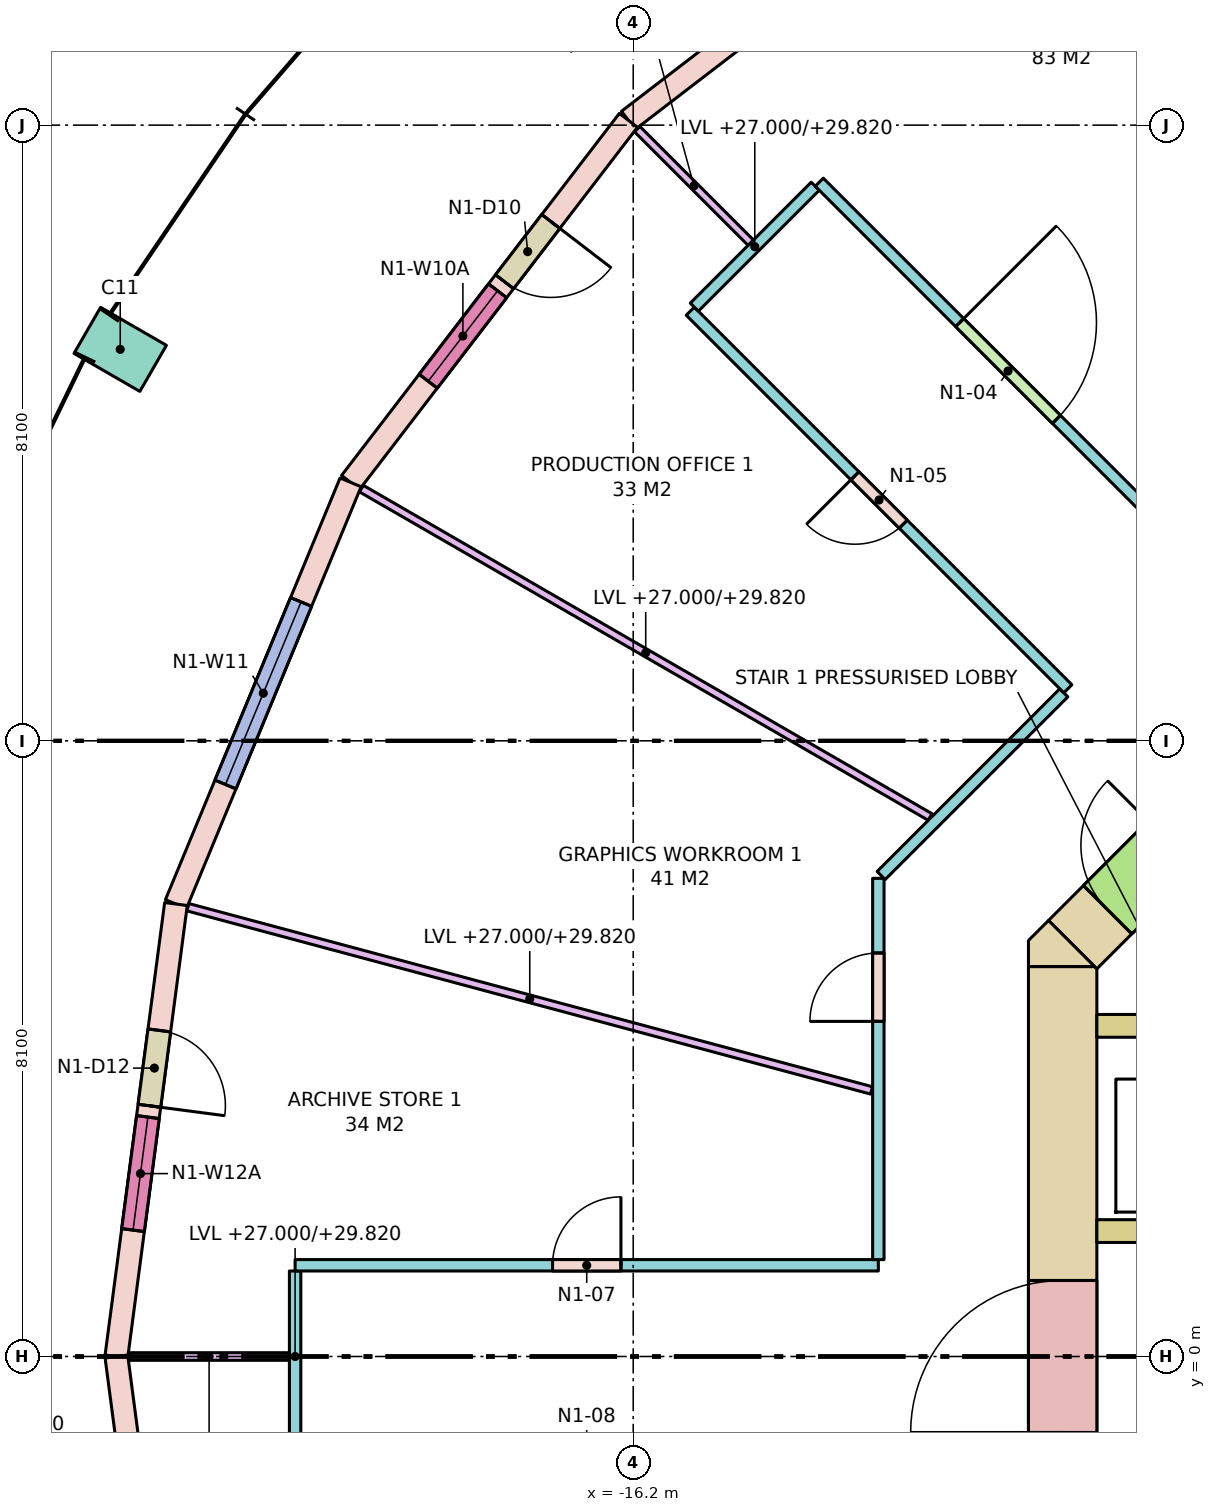
"""IFC4 building model, lengths in metres.
Left out: names, types, materials, properties, quantities, classifications, styles, units other than length and angle.
Written with IfcOpenShell. Run it as: python <this file> out.ifc"""

import sys

from ifc_helpers import new_model, si_unit, direction, frame, frame_2d, origin, origin_2d, place, context, subcontext, project, spatial, polyline, rectangle, outline, extrude, element, fill, save


model = new_model("IFC4")
c1 = context("Model", 3, precision=1e-05, world=origin(), true_north=direction((0.0, 1.0)))
c2 = subcontext(c1, "Body", "Model", "MODEL_VIEW")
j1 = project(units=[si_unit("LENGTHUNIT", "METRE"), si_unit("PLANEANGLEUNIT", "RADIAN")], contexts=[c1])
p1 = place(None, origin())
s1 = spatial("IfcSite", under=j1, at=p1, CompositionType="ELEMENT")
p2 = place(p1, origin())
s2 = spatial("IfcBuilding", under=s1, at=p2, CompositionType="ELEMENT")
p3 = place(p2, frame((0.0, 0.0, 27.0)))
s3 = spatial("IfcBuildingStorey", under=s2, at=p3, CompositionType="ELEMENT", Elevation=27.0)
p4 = place(p3, frame((-22.95, 13.25, 0.0), z_axis=(0.0, 0.0, 1.0), x_axis=(-0.5, -0.866025403784, 0.0)))
e1 = element("IfcColumn", 1, at=p4, inside=s3, PredefinedType="COLUMN", context=c2, shape_type="SweptSolid", body=[
    extrude(rectangle(XDim=0.7, YDim=1.0, at=origin_2d()), origin(), (0.0, 0.0, 1.0), 4.0),
])
p5 = place(p3, frame((-10.55, -5.13, -0.28), z_axis=(0.0, 0.0, 1.0), x_axis=(0.0, 1.0, 0.0)))
e2 = element("IfcWall", 2, at=p5, inside=s3, PredefinedType="SHEAR", context=c2, shape_type="SweptSolid", body=[
    extrude(rectangle(XDim=10.26, YDim=0.9, at=frame_2d((5.13, 0.0))), origin(), (0.0, 0.0, 1.0), 4.0),
])
p6 = place(p5, frame((4.13, 0.0, 0.28)))
e3 = element("IfcOpeningElement", 3, at=p6, cuts=e2, PredefinedType="OPENING", context=c2, shape_type="SweptSolid", body=[
    extrude(rectangle(XDim=2.0, YDim=2.1, at=frame_2d((1.0, 1.05))), frame((0.0, 0.46, 0.0), z_axis=(0.0, -1.0, 0.0), x_axis=(1.0, 0.0, 0.0)), (0.0, 0.0, 1.0), 0.92),
])
p7 = place(p3, frame((-10.418, 5.418, -0.28), z_axis=(0.0, 0.0, 1.0), x_axis=(0.707106781187, 0.707106781187, 0.0)))
e4 = element("IfcWall", 4, at=p7, inside=s3, PredefinedType="SHEAR", context=c2, shape_type="SweptSolid", body=[
    extrude(rectangle(XDim=4.243, YDim=0.9, at=frame_2d((2.121, 0.0))), origin(), (0.0, 0.0, 1.0), 4.0),
])
p8 = place(p7, frame((0.65, 0.0, 0.28)))
e5 = element("IfcOpeningElement", 5, at=p8, cuts=e4, PredefinedType="OPENING", context=c2, shape_type="SweptSolid", body=[
    extrude(rectangle(XDim=1.2, YDim=2.1, at=frame_2d((0.6, 1.05))), frame((0.0, 0.46, 0.0), z_axis=(0.0, -1.0, 0.0), x_axis=(1.0, 0.0, 0.0)), (0.0, 0.0, 1.0), 0.92),
])
p9 = place(p3, frame((0.0, 0.0, -0.28)))
e6 = element("IfcWall", 6, at=p9, inside=s3, PredefinedType="SHEAR", context=c2, shape_type="SweptSolid", body=[
    extrude(outline(polyline([(-10.736, 5.736), (-10.13, 5.13), (-11.0, 5.13), (-11.0, 5.473), (-10.736, 5.736)])), origin(), (0.0, 0.0, 1.0), 4.0),
])
p10 = place(p3, frame((-10.1, 4.35, 0.0), z_axis=(0.0, 0.0, 1.0), x_axis=(1.0, 0.0, 0.0)))
e7 = element("IfcWall", 7, at=p10, inside=s3, PredefinedType="SOLIDWALL", context=c2, shape_type="SweptSolid", body=[
    extrude(rectangle(XDim=8.1, YDim=0.3, at=frame_2d((4.05, 0.0))), origin(), (0.0, 0.0, 1.0), 3.72),
])
p11 = place(p3, frame((-10.1, 1.65, 0.0), z_axis=(0.0, 0.0, 1.0), x_axis=(1.0, 0.0, 0.0)))
e8 = element("IfcWall", 8, at=p11, inside=s3, PredefinedType="SOLIDWALL", context=c2, shape_type="SweptSolid", body=[
    extrude(rectangle(XDim=8.1, YDim=0.3, at=frame_2d((4.05, 0.0))), origin(), (0.0, 0.0, 1.0), 3.72),
])
p12 = place(p11, frame((0.7, 0.0, 0.0)))
e9 = element("IfcOpeningElement", 9, at=p12, cuts=e8, PredefinedType="OPENING", context=c2, shape_type="SweptSolid", body=[
    extrude(rectangle(XDim=1.1, YDim=2.1, at=frame_2d((0.55, 1.05))), frame((0.0, 0.16, 0.0), z_axis=(0.0, -1.0, 0.0), x_axis=(1.0, 0.0, 0.0)), (0.0, 0.0, 1.0), 0.32),
])
p13 = place(p11, frame((3.5, 0.0, 0.0)))
e10 = element("IfcOpeningElement", 10, at=p13, cuts=e8, PredefinedType="OPENING", context=c2, shape_type="SweptSolid", body=[
    extrude(rectangle(XDim=1.1, YDim=2.1, at=frame_2d((0.55, 1.05))), frame((0.0, 0.16, 0.0), z_axis=(0.0, -1.0, 0.0), x_axis=(1.0, 0.0, 0.0)), (0.0, 0.0, 1.0), 0.32),
])
p14 = place(p11, frame((6.15, 0.0, 0.0)))
e11 = element("IfcOpeningElement", 11, at=p14, cuts=e8, PredefinedType="OPENING", context=c2, shape_type="SweptSolid", body=[
    extrude(rectangle(XDim=1.1, YDim=2.1, at=frame_2d((0.55, 1.05))), frame((0.0, 0.16, 0.0), z_axis=(0.0, -1.0, 0.0), x_axis=(1.0, 0.0, 0.0)), (0.0, 0.0, 1.0), 0.32),
])
p15 = place(p3, frame((-11.5, 19.919, 0.0), z_axis=(0.0, 0.0, 1.0), x_axis=(-0.793339924758, -0.608778912074, 0.0)))
e12 = element("IfcWall", 12, at=p15, inside=s3, PredefinedType="STANDARD", context=c2, shape_type="SweptSolid", body=[
    extrude(rectangle(XDim=6.004, YDim=0.3, at=frame_2d((3.002, 0.0))), origin(), (0.0, 0.0, 1.0), 3.72),
])
p16 = place(p15, frame((1.702, 0.0, 0.8)))
e13 = element("IfcOpeningElement", 13, at=p16, cuts=e12, PredefinedType="OPENING", context=c2, shape_type="SweptSolid", body=[
    extrude(rectangle(XDim=2.6, YDim=2.7, at=frame_2d((1.3, 1.35))), frame((0.0, 0.16, 0.0), z_axis=(0.0, -1.0, 0.0), x_axis=(1.0, 0.0, 0.0)), (0.0, 0.0, 1.0), 0.32),
])
p17 = place(p3, frame((-16.263, 16.263, 0.0), z_axis=(0.0, 0.0, 1.0), x_axis=(-0.608778912074, -0.793339924758, 0.0)))
e14 = element("IfcWall", 14, at=p17, inside=s3, PredefinedType="STANDARD", context=c2, shape_type="SweptSolid", body=[
    extrude(rectangle(XDim=6.004, YDim=0.3, at=frame_2d((3.002, 0.0))), origin(), (0.0, 0.0, 1.0), 3.72),
])
p18 = place(p17, frame((1.677, 0.0, 0.0)))
e15 = element("IfcOpeningElement", 15, at=p18, cuts=e14, PredefinedType="OPENING", context=c2, shape_type="SweptSolid", body=[
    extrude(rectangle(XDim=1.0, YDim=2.4, at=frame_2d((0.5, 1.2))), frame((0.0, 0.16, 0.0), z_axis=(0.0, -1.0, 0.0), x_axis=(1.0, 0.0, 0.0)), (0.0, 0.0, 1.0), 0.32),
])
p19 = place(p17, frame((2.827, 0.0, 0.8)))
e16 = element("IfcOpeningElement", 16, at=p19, cuts=e14, PredefinedType="OPENING", context=c2, shape_type="SweptSolid", body=[
    extrude(rectangle(XDim=1.5, YDim=2.7, at=frame_2d((0.75, 1.35))), frame((0.0, 0.16, 0.0), z_axis=(0.0, -1.0, 0.0), x_axis=(1.0, 0.0, 0.0)), (0.0, 0.0, 1.0), 0.32),
])
p20 = place(p3, frame((-19.919, 11.5, 0.0), z_axis=(0.0, 0.0, 1.0), x_axis=(-0.382671411433, -0.923884511653, 0.0)))
e17 = element("IfcWall", 17, at=p20, inside=s3, PredefinedType="STANDARD", context=c2, shape_type="SweptSolid", body=[
    extrude(rectangle(XDim=6.004, YDim=0.3, at=frame_2d((3.002, 0.0))), origin(), (0.0, 0.0, 1.0), 3.72),
])
p21 = place(p20, frame((1.702, 0.0, 0.8)))
e18 = element("IfcOpeningElement", 18, at=p21, cuts=e17, PredefinedType="OPENING", context=c2, shape_type="SweptSolid", body=[
    extrude(rectangle(XDim=2.6, YDim=2.7, at=frame_2d((1.3, 1.35))), frame((0.0, 0.16, 0.0), z_axis=(0.0, -1.0, 0.0), x_axis=(1.0, 0.0, 0.0)), (0.0, 0.0, 1.0), 0.32),
])
p22 = place(p3, frame((-22.216, 5.953, 0.0), z_axis=(0.0, 0.0, 1.0), x_axis=(-0.130522880875, -0.991445297315, 0.0)))
e19 = element("IfcWall", 19, at=p22, inside=s3, PredefinedType="STANDARD", context=c2, shape_type="SweptSolid", body=[
    extrude(rectangle(XDim=6.004, YDim=0.3, at=frame_2d((3.002, 0.0))), origin(), (0.0, 0.0, 1.0), 3.72),
])
p23 = place(p22, frame((1.677, 0.0, 0.0)))
e20 = element("IfcOpeningElement", 20, at=p23, cuts=e19, PredefinedType="OPENING", context=c2, shape_type="SweptSolid", body=[
    extrude(rectangle(XDim=1.0, YDim=2.4, at=frame_2d((0.5, 1.2))), frame((0.0, 0.16, 0.0), z_axis=(0.0, -1.0, 0.0), x_axis=(1.0, 0.0, 0.0)), (0.0, 0.0, 1.0), 0.32),
])
p24 = place(p22, frame((2.827, 0.0, 0.8)))
e21 = element("IfcOpeningElement", 21, at=p24, cuts=e19, PredefinedType="OPENING", context=c2, shape_type="SweptSolid", body=[
    extrude(rectangle(XDim=1.5, YDim=2.7, at=frame_2d((0.75, 1.35))), frame((0.0, 0.16, 0.0), z_axis=(0.0, -1.0, 0.0), x_axis=(1.0, 0.0, 0.0)), (0.0, 0.0, 1.0), 0.32),
])
p25 = place(p3, frame((-23.0, 0.0, 0.0), z_axis=(0.0, 0.0, 1.0), x_axis=(0.130522880875, -0.991445297315, 0.0)))
e22 = element("IfcWall", 22, at=p25, inside=s3, PredefinedType="STANDARD", context=c2, shape_type="SweptSolid", body=[
    extrude(rectangle(XDim=6.004, YDim=0.3, at=frame_2d((3.002, 0.0))), origin(), (0.0, 0.0, 1.0), 3.72),
])
p26 = place(p25, frame((1.702, 0.0, 0.8)))
e23 = element("IfcOpeningElement", 23, at=p26, cuts=e22, PredefinedType="OPENING", context=c2, shape_type="SweptSolid", body=[
    extrude(rectangle(XDim=2.6, YDim=2.7, at=frame_2d((1.3, 1.35))), frame((0.0, 0.16, 0.0), z_axis=(0.0, -1.0, 0.0), x_axis=(1.0, 0.0, 0.0)), (0.0, 0.0, 1.0), 0.32),
])
p27 = place(p3, frame((-20.649, -1.125, 0.0), z_axis=(0.0, 0.0, 1.0), x_axis=(0.0, 1.0, 0.0)))
e24 = element("IfcWall", 24, at=p27, inside=s3, PredefinedType="PARTITIONING", context=c2, shape_type="SweptSolid", body=[
    extrude(rectangle(XDim=2.25, YDim=0.15, at=frame_2d((1.125, 0.0))), origin(), (0.0, 0.0, 1.0), 2.82),
])
p28 = place(p3, frame((-20.649, 1.2, 0.0), z_axis=(0.0, 0.0, 1.0), x_axis=(1.0, 0.0, 0.0)))
e25 = element("IfcWall", 25, at=p28, inside=s3, PredefinedType="PARTITIONING", context=c2, shape_type="SweptSolid", body=[
    extrude(rectangle(XDim=7.674, YDim=0.15, at=frame_2d((3.837, 0.0))), origin(), (0.0, 0.0, 1.0), 3.72),
])
p29 = place(p28, frame((3.387, 0.0, 0.0)))
e26 = element("IfcOpeningElement", 26, at=p29, cuts=e25, PredefinedType="OPENING", context=c2, shape_type="SweptSolid", body=[
    extrude(rectangle(XDim=0.9, YDim=2.1, at=frame_2d((0.45, 1.05))), frame((0.0, 0.085, 0.0), z_axis=(0.0, -1.0, 0.0), x_axis=(1.0, 0.0, 0.0)), (0.0, 0.0, 1.0), 0.17),
])
p30 = place(p3, frame((-12.975, 1.275, 0.0), z_axis=(0.0, 0.0, 1.0), x_axis=(0.0, 1.0, 0.0)))
e27 = element("IfcWall", 27, at=p30, inside=s3, PredefinedType="PARTITIONING", context=c2, shape_type="SweptSolid", body=[
    extrude(rectangle(XDim=5.016, YDim=0.15, at=frame_2d((2.508, 0.0))), origin(), (0.0, 0.0, 1.0), 2.82),
])
p31 = place(p30, frame((3.134, 0.0, 0.0)))
e28 = element("IfcOpeningElement", 28, at=p31, cuts=e27, PredefinedType="OPENING", context=c2, shape_type="SweptSolid", body=[
    extrude(rectangle(XDim=0.9, YDim=2.1, at=frame_2d((0.45, 1.05))), frame((0.0, 0.085, 0.0), z_axis=(0.0, -1.0, 0.0), x_axis=(1.0, 0.0, 0.0)), (0.0, 0.0, 1.0), 0.17),
])
p32 = place(p3, frame((-12.938, 6.328, 0.0), z_axis=(0.0, 0.0, 1.0), x_axis=(0.707106781187, 0.707106781187, 0.0)))
e29 = element("IfcWall", 29, at=p32, inside=s3, PredefinedType="PARTITIONING", context=c2, shape_type="SweptSolid", body=[
    extrude(rectangle(XDim=3.399, YDim=0.15, at=frame_2d((1.7, 0.0))), origin(), (0.0, 0.0, 1.0), 2.82),
])
p33 = place(p3, frame((-10.481, 8.784, 0.0), z_axis=(0.0, 0.0, 1.0), x_axis=(-0.707124155885, 0.707089406061, 0.0)))
e30 = element("IfcWall", 30, at=p33, inside=s3, PredefinedType="PARTITIONING", context=c2, shape_type="SweptSolid", body=[
    extrude(rectangle(XDim=7.026, YDim=0.15, at=frame_2d((3.513, 0.0))), origin(), (0.0, 0.0, 1.0), 3.72),
])
p34 = place(p33, frame((3.063, 0.0, 0.0)))
e31 = element("IfcOpeningElement", 31, at=p34, cuts=e30, PredefinedType="OPENING", context=c2, shape_type="SweptSolid", body=[
    extrude(rectangle(XDim=0.9, YDim=2.1, at=frame_2d((0.45, 1.05))), frame((0.0, 0.085, 0.0), z_axis=(0.0, -1.0, 0.0), x_axis=(1.0, 0.0, 0.0)), (0.0, 0.0, 1.0), 0.17),
])
p35 = place(p3, frame((-15.396, 13.805, 0.0), z_axis=(0.0, 0.0, 1.0), x_axis=(0.707106781187, 0.707106781187, 0.0)))
e32 = element("IfcWall", 32, at=p35, inside=s3, PredefinedType="PARTITIONING", context=c2, shape_type="SweptSolid", body=[
    extrude(rectangle(XDim=2.25, YDim=0.15, at=frame_2d((1.125, 0.0))), origin(), (0.0, 0.0, 1.0), 2.82),
])
p36 = place(p3, frame((-13.752, 15.449, 0.0), z_axis=(0.0, 0.0, 1.0), x_axis=(0.707089406061, -0.707124155885, 0.0)))
e33 = element("IfcWall", 33, at=p36, inside=s3, PredefinedType="PARTITIONING", context=c2, shape_type="SweptSolid", body=[
    extrude(rectangle(XDim=7.026, YDim=0.15, at=frame_2d((3.513, 0.0))), origin(), (0.0, 0.0, 1.0), 3.72),
])
p37 = place(p36, frame((2.613, 0.0, 0.0)))
e34 = element("IfcOpeningElement", 34, at=p37, cuts=e33, PredefinedType="OPENING", context=c2, shape_type="SweptSolid", body=[
    extrude(rectangle(XDim=1.8, YDim=2.1, at=frame_2d((0.9, 1.05))), frame((0.0, 0.085, 0.0), z_axis=(0.0, -1.0, 0.0), x_axis=(1.0, 0.0, 0.0)), (0.0, 0.0, 1.0), 0.17),
])
p38 = place(p3, frame((-14.654, 14.654, 0.0), z_axis=(0.0, 0.0, 1.0), x_axis=(-0.707106781187, 0.707106781187, 0.0)))
e35 = element("IfcWall", 35, at=p38, inside=s3, PredefinedType="PARTITIONING", context=c2, shape_type="SweptSolid", body=[
    extrude(rectangle(XDim=2.113, YDim=0.1, at=frame_2d((1.057, 0.0))), origin(), (0.0, 0.0, 1.0), 2.82),
])
p39 = place(p3, frame((-12.294, 7.098, 0.0), z_axis=(0.0, 0.0, 1.0), x_axis=(-0.866010547425, 0.500025731086, 0.0)))
e36 = element("IfcWall", 36, at=p39, inside=s3, PredefinedType="PARTITIONING", context=c2, shape_type="SweptSolid", body=[
    extrude(rectangle(XDim=8.641, YDim=0.1, at=frame_2d((4.32, 0.0))), origin(), (0.0, 0.0, 1.0), 2.82),
])
p40 = place(p3, frame((-13.064, 3.5, 0.0), z_axis=(0.0, 0.0, 1.0), x_axis=(-0.965922655056, 0.258830880017, 0.0)))
e37 = element("IfcWall", 37, at=p40, inside=s3, PredefinedType="PARTITIONING", context=c2, shape_type="SweptSolid", body=[
    extrude(rectangle(XDim=9.312, YDim=0.1, at=frame_2d((4.656, 0.0))), origin(), (0.0, 0.0, 1.0), 2.82),
])
p41 = place(p3, frame((-20.724, 0.0, 0.0), z_axis=(0.0, 0.0, 1.0), x_axis=(-1.0, 0.0, 0.0)))
e38 = element("IfcWall", 38, at=p41, inside=s3, PredefinedType="PARTITIONING", context=c2, shape_type="SweptSolid", body=[
    extrude(rectangle(XDim=2.113, YDim=0.1, at=frame_2d((1.057, 0.0))), origin(), (0.0, 0.0, 1.0), 2.82),
])
p42 = place(p18, origin())
e39 = element("IfcDoor", 39, at=p42, inside=s3, OperationType="SINGLE_SWING_LEFT", PredefinedType="DOOR", context=c2, shape_type="SweptSolid", body=[
    extrude(rectangle(XDim=1.0, YDim=2.4, at=frame_2d((0.5, 1.2))), frame((0.0, 0.025, 0.0), z_axis=(0.0, -1.0, 0.0), x_axis=(1.0, 0.0, 0.0)), (0.0, 0.0, 1.0), 0.05),
])
fill(e15, e39)
p43 = place(p19, origin())
e40 = element("IfcWindow", 40, at=p43, inside=s3, PartitioningType="SINGLE_PANEL", PredefinedType="WINDOW", context=c2, shape_type="SweptSolid", body=[
    extrude(rectangle(XDim=1.5, YDim=2.7, at=frame_2d((0.75, 1.35))), frame((0.0, 0.03, 0.0), z_axis=(0.0, -1.0, 0.0), x_axis=(1.0, 0.0, 0.0)), (0.0, 0.0, 1.0), 0.06),
])
fill(e16, e40)
p44 = place(p21, origin())
e41 = element("IfcWindow", 41, at=p44, inside=s3, PartitioningType="SINGLE_PANEL", PredefinedType="WINDOW", context=c2, shape_type="SweptSolid", body=[
    extrude(rectangle(XDim=2.6, YDim=2.7, at=frame_2d((1.3, 1.35))), frame((0.0, 0.03, 0.0), z_axis=(0.0, -1.0, 0.0), x_axis=(1.0, 0.0, 0.0)), (0.0, 0.0, 1.0), 0.06),
])
fill(e18, e41)
p45 = place(p23, origin())
e42 = element("IfcDoor", 42, at=p45, inside=s3, OperationType="SINGLE_SWING_RIGHT", PredefinedType="DOOR", context=c2, shape_type="SweptSolid", body=[
    extrude(rectangle(XDim=1.0, YDim=2.4, at=frame_2d((0.5, 1.2))), frame((0.0, 0.025, 0.0), z_axis=(0.0, -1.0, 0.0), x_axis=(1.0, 0.0, 0.0)), (0.0, 0.0, 1.0), 0.05),
])
fill(e20, e42)
p46 = place(p24, origin())
e43 = element("IfcWindow", 43, at=p46, inside=s3, PartitioningType="SINGLE_PANEL", PredefinedType="WINDOW", context=c2, shape_type="SweptSolid", body=[
    extrude(rectangle(XDim=1.5, YDim=2.7, at=frame_2d((0.75, 1.35))), frame((0.0, 0.03, 0.0), z_axis=(0.0, -1.0, 0.0), x_axis=(1.0, 0.0, 0.0)), (0.0, 0.0, 1.0), 0.06),
])
fill(e21, e43)
p47 = place(p8, origin())
e44 = element("IfcDoor", 44, at=p47, inside=s3, OperationType="SINGLE_SWING_RIGHT", PredefinedType="DOOR", context=c2, shape_type="SweptSolid", body=[
    extrude(rectangle(XDim=1.2, YDim=2.1, at=frame_2d((0.6, 1.05))), frame((0.0, 0.025, 0.0), z_axis=(0.0, -1.0, 0.0), x_axis=(1.0, 0.0, 0.0)), (0.0, 0.0, 1.0), 0.05),
])
fill(e5, e44)
p48 = place(p6, origin())
e45 = element("IfcDoor", 45, at=p48, inside=s3, OperationType="DOUBLE_DOOR_SINGLE_SWING", PredefinedType="DOOR", context=c2, shape_type="SweptSolid", body=[
    extrude(rectangle(XDim=2.0, YDim=2.1, at=frame_2d((1.0, 1.05))), frame((0.0, 0.025, 0.0), z_axis=(0.0, -1.0, 0.0), x_axis=(1.0, 0.0, 0.0)), (0.0, 0.0, 1.0), 0.05),
])
fill(e3, e45)
p49 = place(p37, origin())
e46 = element("IfcDoor", 46, at=p49, inside=s3, OperationType="DOUBLE_DOOR_SINGLE_SWING", PredefinedType="DOOR", context=c2, shape_type="SweptSolid", body=[
    extrude(rectangle(XDim=1.8, YDim=2.1, at=frame_2d((0.9, 1.05))), frame((0.0, 0.025, 0.0), z_axis=(0.0, -1.0, 0.0), x_axis=(1.0, 0.0, 0.0)), (0.0, 0.0, 1.0), 0.05),
])
fill(e34, e46)
p50 = place(p34, origin())
e47 = element("IfcDoor", 47, at=p50, inside=s3, OperationType="SINGLE_SWING_RIGHT", PredefinedType="DOOR", context=c2, shape_type="SweptSolid", body=[
    extrude(rectangle(XDim=0.9, YDim=2.1, at=frame_2d((0.45, 1.05))), frame((0.0, 0.025, 0.0), z_axis=(0.0, -1.0, 0.0), x_axis=(1.0, 0.0, 0.0)), (0.0, 0.0, 1.0), 0.05),
])
fill(e31, e47)
p51 = place(p31, origin())
e48 = element("IfcDoor", 48, at=p51, inside=s3, OperationType="SINGLE_SWING_LEFT", PredefinedType="DOOR", context=c2, shape_type="SweptSolid", body=[
    extrude(rectangle(XDim=0.9, YDim=2.1, at=frame_2d((0.45, 1.05))), frame((0.0, 0.025, 0.0), z_axis=(0.0, -1.0, 0.0), x_axis=(1.0, 0.0, 0.0)), (0.0, 0.0, 1.0), 0.05),
])
fill(e28, e48)
p52 = place(p29, origin())
e49 = element("IfcDoor", 49, at=p52, inside=s3, OperationType="SINGLE_SWING_RIGHT", PredefinedType="DOOR", context=c2, shape_type="SweptSolid", body=[
    extrude(rectangle(XDim=0.9, YDim=2.1, at=frame_2d((0.45, 1.05))), frame((0.0, 0.025, 0.0), z_axis=(0.0, -1.0, 0.0), x_axis=(1.0, 0.0, 0.0)), (0.0, 0.0, 1.0), 0.05),
])
fill(e26, e49)
save(model, sys.argv[1])
